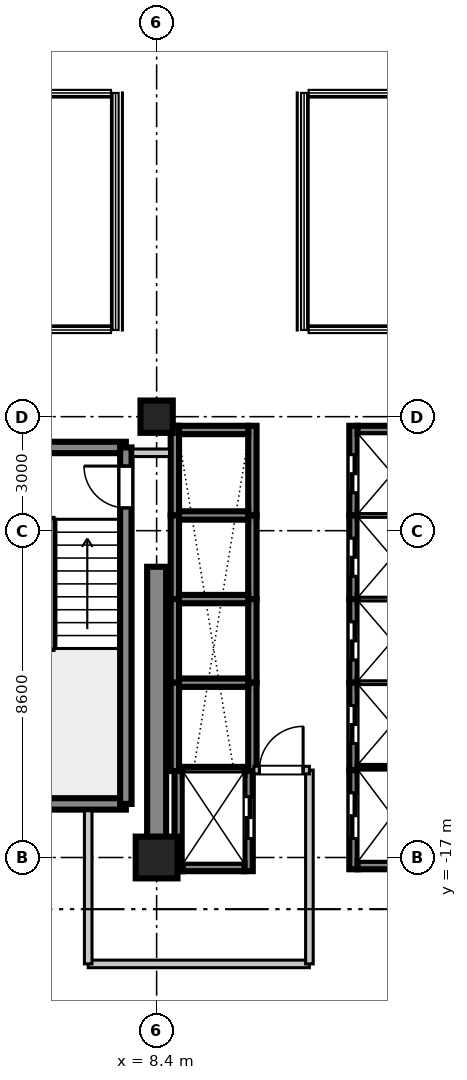
"""IFC4 building model, lengths in metres.
Left out: names, types, materials, properties, quantities, classifications, styles, units other than length and angle.
Written with IfcOpenShell. Run it as: python <this file> out.ifc"""

import sys

from ifc_helpers import new_model, si_unit, direction, frame, frame_2d, origin, origin_2d, place, context, subcontext, project, spatial, rectangle, extrude, source, transform, mapped, element, fill, save


model = new_model("IFC4")
c1 = context("Model", 3, precision=1e-05, world=origin(), true_north=direction((0.0, 1.0)))
c2 = subcontext(c1, "Body", "Model", "MODEL_VIEW")
j1 = project(units=[si_unit("LENGTHUNIT", "METRE"), si_unit("PLANEANGLEUNIT", "RADIAN")], contexts=[c1])
p1 = place(None, origin())
s1 = spatial("IfcSite", under=j1, at=p1, CompositionType="ELEMENT")
p2 = place(p1, origin())
s2 = spatial("IfcBuilding", under=s1, at=p2, CompositionType="ELEMENT")
p3 = place(p2, frame((0.0, 0.0, 185.5)))
s3 = spatial("IfcBuildingStorey", under=s2, at=p3, CompositionType="ELEMENT", Elevation=185.5)
m1 = source(origin(), c2, "Body", "SweptSolid", [
    extrude(rectangle(XDim=1.1, YDim=1.1, at=origin_2d()), origin(), (0.0, 0.0, 1.0), 3.605),
])
p4 = place(p3, frame((8.4, -17.0, 0.0), z_axis=(0.0, 0.0, 1.0), x_axis=(1.0, 0.0, 0.0)))
e1 = element("IfcColumn", 1, at=p4, inside=s3, PredefinedType="COLUMN", context=c2, shape_type="MappedRepresentation", body=[
    mapped(m1, transform((0.0, 0.0, 0.0), scale=1.0)),
])
m2 = source(origin(), c2, "Body", "SweptSolid", [
    extrude(rectangle(XDim=0.85, YDim=0.85, at=origin_2d()), origin(), (0.0, 0.0, 1.0), 3.605),
])
p5 = place(p3, frame((8.4, -5.4, 0.0), z_axis=(0.0, 0.0, 1.0), x_axis=(1.0, 0.0, 0.0)))
e2 = element("IfcColumn", 2, at=p5, inside=s3, PredefinedType="PILASTER", context=c2, shape_type="MappedRepresentation", body=[
    mapped(m2, transform((0.0, 0.0, 0.0), scale=1.0)),
])
m3 = source(origin(), c2, "Body", "SweptSolid", [
    extrude(rectangle(XDim=7.65, YDim=0.5, at=frame_2d((3.825, 0.0))), origin(), (0.0, 0.0, 1.0), 3.39),
])
p6 = place(p3, frame((8.4, -17.0, 0.0), z_axis=(0.0, 0.0, 1.0), x_axis=(0.0, 1.0, 0.0)))
e3 = element("IfcWall", 3, at=p6, inside=s3, PredefinedType="SHEAR", context=c2, shape_type="MappedRepresentation", body=[
    mapped(m3, transform((0.0, 0.0, 0.0), scale=1.0)),
])
m4 = source(origin(), c2, "Body", "SweptSolid", [
    extrude(rectangle(XDim=3.98, YDim=0.3, at=frame_2d((1.99, 0.0))), origin(), (0.0, 0.0, 1.0), 3.39),
])
for number, where, z_axis, x_axis in (
    (4, (3.61, -15.59, 0.0), (0.0, 0.0, 1.0), (1.0, 0.0, 0.0)),
    (5, (3.61, -6.21, 0.0), (0.0, 0.0, 1.0), (1.0, 0.0, 0.0)),
):
    element("IfcWall", number, at=place(p3, frame(where, z_axis=z_axis, x_axis=x_axis)), inside=s3, PredefinedType="SHEAR", context=c2, shape_type="MappedRepresentation", body=[
        mapped(m4, transform((0.0, 0.0, 0.0), scale=1.0)),
    ])
m5 = source(origin(), c2, "Body", "SweptSolid", [
    extrude(rectangle(XDim=9.38, YDim=0.3, at=frame_2d((4.69, 0.0))), origin(), (0.0, 0.0, 1.0), 3.39),
])
p7 = place(p3, frame((7.59, -15.59, 0.0), z_axis=(0.0, 0.0, 1.0), x_axis=(0.0, 1.0, 0.0)))
e6 = element("IfcWall", 6, at=p7, inside=s3, PredefinedType="SHEAR", context=c2, shape_type="MappedRepresentation", body=[
    mapped(m5, transform((0.0, 0.0, 0.0), scale=1.0)),
])
p8 = place(p7, frame((7.79, 0.0, 0.0)))
e7 = element("IfcOpeningElement", 7, at=p8, cuts=e6, PredefinedType="OPENING", context=c2, shape_type="SweptSolid", body=[
    extrude(rectangle(XDim=1.1, YDim=2.15, at=frame_2d((0.55, 1.075))), frame((0.0, 0.16, 0.0), z_axis=(0.0, -1.0, 0.0), x_axis=(1.0, 0.0, 0.0)), (0.0, 0.0, 1.0), 0.32),
])
m6 = source(origin(), c2, "Body", "SweptSolid", [
    extrude(rectangle(XDim=2.36, YDim=0.22, at=frame_2d((1.18, 0.0))), origin(), (0.0, 0.0, 1.0), 3.39),
])
p9 = place(p3, frame((13.58, -8.0, 0.0), z_axis=(0.0, 0.0, 1.0), x_axis=(0.0, 1.0, 0.0)))
e8 = element("IfcWall", 8, at=p9, inside=s3, PredefinedType="SHEAR", context=c2, shape_type="MappedRepresentation", body=[
    mapped(m6, transform((0.0, 0.0, 0.0), scale=1.0)),
])
p10 = place(p9, frame((0.6, 0.0, 0.0)))
e9 = element("IfcOpeningElement", 9, at=p10, cuts=e8, PredefinedType="OPENING", context=c2, shape_type="SweptSolid", body=[
    extrude(rectangle(XDim=1.0, YDim=2.2, at=frame_2d((0.5, 1.1))), frame((0.0, 0.12, 0.0), z_axis=(0.0, -1.0, 0.0), x_axis=(1.0, 0.0, 0.0)), (0.0, 0.0, 1.0), 0.24),
])
m7 = source(origin(), c2, "Body", "SweptSolid", [
    extrude(rectangle(XDim=1.82, YDim=0.22, at=frame_2d((0.91, 0.0))), origin(), (0.0, 0.0, 1.0), 3.39),
])
p11 = place(p3, frame((13.69, -5.75, 0.0), z_axis=(0.0, 0.0, 1.0), x_axis=(1.0, 0.0, 0.0)))
e10 = element("IfcWall", 10, at=p11, inside=s3, PredefinedType="SHEAR", context=c2, shape_type="MappedRepresentation", body=[
    mapped(m7, transform((0.0, 0.0, 0.0), scale=1.0)),
])
m8 = source(origin(), c2, "Body", "SweptSolid", [
    extrude(rectangle(XDim=2.2, YDim=0.22, at=frame_2d((1.1, 0.0))), origin(), (0.0, 0.0, 1.0), 3.39),
])
p12 = place(p3, frame((13.58, -10.2, 0.0), z_axis=(0.0, 0.0, 1.0), x_axis=(0.0, 1.0, 0.0)))
e11 = element("IfcWall", 11, at=p12, inside=s3, PredefinedType="SHEAR", context=c2, shape_type="MappedRepresentation", body=[
    mapped(m8, transform((0.0, 0.0, 0.0), scale=1.0)),
])
p13 = place(p12, frame((0.6, 0.0, 0.0)))
e12 = element("IfcOpeningElement", 12, at=p13, cuts=e11, PredefinedType="OPENING", context=c2, shape_type="SweptSolid", body=[
    extrude(rectangle(XDim=1.0, YDim=2.2, at=frame_2d((0.5, 1.1))), frame((0.0, 0.12, 0.0), z_axis=(0.0, -1.0, 0.0), x_axis=(1.0, 0.0, 0.0)), (0.0, 0.0, 1.0), 0.24),
])
m9 = source(origin(), c2, "Body", "SweptSolid", [
    extrude(rectangle(XDim=1.82, YDim=0.22, at=frame_2d((0.91, 0.0))), origin(), (0.0, 0.0, 1.0), 3.65),
])
p14 = place(p3, frame((13.69, -8.0, 0.0), z_axis=(0.0, 0.0, 1.0), x_axis=(1.0, 0.0, 0.0)))
e13 = element("IfcWall", 13, at=p14, inside=s3, PredefinedType="SHEAR", context=c2, shape_type="MappedRepresentation", body=[
    mapped(m9, transform((0.0, 0.0, 0.0), scale=1.0)),
])
p15 = place(p3, frame((13.58, -12.4, 0.0), z_axis=(0.0, 0.0, 1.0), x_axis=(0.0, 1.0, 0.0)))
e14 = element("IfcWall", 14, at=p15, inside=s3, PredefinedType="SHEAR", context=c2, shape_type="MappedRepresentation", body=[
    mapped(m8, transform((0.0, 0.0, 0.0), scale=1.0)),
])
p16 = place(p15, frame((0.6, 0.0, 0.0)))
e15 = element("IfcOpeningElement", 15, at=p16, cuts=e14, PredefinedType="OPENING", context=c2, shape_type="SweptSolid", body=[
    extrude(rectangle(XDim=1.0, YDim=2.2, at=frame_2d((0.5, 1.1))), frame((0.0, 0.12, 0.0), z_axis=(0.0, -1.0, 0.0), x_axis=(1.0, 0.0, 0.0)), (0.0, 0.0, 1.0), 0.24),
])
p17 = place(p3, frame((13.69, -10.2, 0.0), z_axis=(0.0, 0.0, 1.0), x_axis=(1.0, 0.0, 0.0)))
e16 = element("IfcWall", 16, at=p17, inside=s3, PredefinedType="SHEAR", context=c2, shape_type="MappedRepresentation", body=[
    mapped(m9, transform((0.0, 0.0, 0.0), scale=1.0)),
])
m10 = source(origin(), c2, "Body", "SweptSolid", [
    extrude(rectangle(XDim=2.3, YDim=0.22, at=frame_2d((1.15, 0.0))), origin(), (0.0, 0.0, 1.0), 3.39),
])
p18 = place(p3, frame((13.58, -14.7, 0.0), z_axis=(0.0, 0.0, 1.0), x_axis=(0.0, 1.0, 0.0)))
e17 = element("IfcWall", 17, at=p18, inside=s3, PredefinedType="SHEAR", context=c2, shape_type="MappedRepresentation", body=[
    mapped(m10, transform((0.0, 0.0, 0.0), scale=1.0)),
])
p19 = place(p18, frame((0.7, 0.0, 0.0)))
e18 = element("IfcOpeningElement", 18, at=p19, cuts=e17, PredefinedType="OPENING", context=c2, shape_type="SweptSolid", body=[
    extrude(rectangle(XDim=1.0, YDim=2.2, at=frame_2d((0.5, 1.1))), frame((0.0, 0.12, 0.0), z_axis=(0.0, -1.0, 0.0), x_axis=(1.0, 0.0, 0.0)), (0.0, 0.0, 1.0), 0.24),
])
p20 = place(p3, frame((13.69, -12.4, 0.0), z_axis=(0.0, 0.0, 1.0), x_axis=(1.0, 0.0, 0.0)))
e19 = element("IfcWall", 19, at=p20, inside=s3, PredefinedType="SHEAR", context=c2, shape_type="MappedRepresentation", body=[
    mapped(m9, transform((0.0, 0.0, 0.0), scale=1.0)),
])
for number, where, z_axis, x_axis in (
    (20, (8.88, -8.0, 0.0), (0.0, 0.0, 1.0), (0.0, 1.0, 0.0)),
    (21, (10.92, -8.0, 0.0), (0.0, 0.0, 1.0), (0.0, 1.0, 0.0)),
):
    element("IfcWall", number, at=place(p3, frame(where, z_axis=z_axis, x_axis=x_axis)), inside=s3, PredefinedType="SHEAR", context=c2, shape_type="MappedRepresentation", body=[
        mapped(m6, transform((0.0, 0.0, 0.0), scale=1.0)),
    ])
p21 = place(p3, frame((8.99, -5.75, 0.0), z_axis=(0.0, 0.0, 1.0), x_axis=(1.0, 0.0, 0.0)))
e22 = element("IfcWall", 22, at=p21, inside=s3, PredefinedType="SHEAR", context=c2, shape_type="MappedRepresentation", body=[
    mapped(m7, transform((0.0, 0.0, 0.0), scale=1.0)),
])
for number, where, z_axis, x_axis in (
    (23, (8.88, -10.2, 0.0), (0.0, 0.0, 1.0), (0.0, 1.0, 0.0)),
    (24, (10.92, -10.2, 0.0), (0.0, 0.0, 1.0), (0.0, 1.0, 0.0)),
):
    element("IfcWall", number, at=place(p3, frame(where, z_axis=z_axis, x_axis=x_axis)), inside=s3, PredefinedType="SHEAR", context=c2, shape_type="MappedRepresentation", body=[
        mapped(m8, transform((0.0, 0.0, 0.0), scale=1.0)),
    ])
p22 = place(p3, frame((8.99, -8.0, 0.0), z_axis=(0.0, 0.0, 1.0), x_axis=(1.0, 0.0, 0.0)))
e25 = element("IfcWall", 25, at=p22, inside=s3, PredefinedType="SHEAR", context=c2, shape_type="MappedRepresentation", body=[
    mapped(m9, transform((0.0, 0.0, 0.0), scale=1.0)),
])
for number, where, z_axis, x_axis in (
    (26, (8.88, -12.4, 0.0), (0.0, 0.0, 1.0), (0.0, 1.0, 0.0)),
    (27, (10.92, -12.4, 0.0), (0.0, 0.0, 1.0), (0.0, 1.0, 0.0)),
):
    element("IfcWall", number, at=place(p3, frame(where, z_axis=z_axis, x_axis=x_axis)), inside=s3, PredefinedType="SHEAR", context=c2, shape_type="MappedRepresentation", body=[
        mapped(m8, transform((0.0, 0.0, 0.0), scale=1.0)),
    ])
p23 = place(p3, frame((8.99, -10.2, 0.0), z_axis=(0.0, 0.0, 1.0), x_axis=(1.0, 0.0, 0.0)))
e28 = element("IfcWall", 28, at=p23, inside=s3, PredefinedType="SHEAR", context=c2, shape_type="MappedRepresentation", body=[
    mapped(m9, transform((0.0, 0.0, 0.0), scale=1.0)),
])
m11 = source(origin(), c2, "Body", "SweptSolid", [
    extrude(rectangle(XDim=2.325, YDim=0.22, at=frame_2d((1.163, 0.0))), origin(), (0.0, 0.0, 1.0), 3.39),
])
for number, where, z_axis, x_axis in (
    (29, (8.88, -14.725, 0.0), (0.0, 0.0, 1.0), (0.0, 1.0, 0.0)),
    (30, (10.92, -14.725, 0.0), (0.0, 0.0, 1.0), (0.0, 1.0, 0.0)),
):
    element("IfcWall", number, at=place(p3, frame(where, z_axis=z_axis, x_axis=x_axis)), inside=s3, PredefinedType="SHEAR", context=c2, shape_type="MappedRepresentation", body=[
        mapped(m11, transform((0.0, 0.0, 0.0), scale=1.0)),
    ])
p24 = place(p3, frame((8.99, -12.4, 0.0), z_axis=(0.0, 0.0, 1.0), x_axis=(1.0, 0.0, 0.0)))
e31 = element("IfcWall", 31, at=p24, inside=s3, PredefinedType="SHEAR", context=c2, shape_type="MappedRepresentation", body=[
    mapped(m9, transform((0.0, 0.0, 0.0), scale=1.0)),
])
m12 = source(origin(), c2, "Body", "SweptSolid", [
    extrude(rectangle(XDim=2.635, YDim=0.22, at=frame_2d((1.317, 0.0))), origin(), (0.0, 0.0, 1.0), 3.39),
])
p25 = place(p3, frame((8.98, -17.36, 0.0), z_axis=(0.0, 0.0, 1.0), x_axis=(0.0, 1.0, 0.0)))
e32 = element("IfcWall", 32, at=p25, inside=s3, PredefinedType="SHEAR", context=c2, shape_type="MappedRepresentation", body=[
    mapped(m12, transform((0.0, 0.0, 0.0), scale=1.0)),
])
p26 = place(p3, frame((10.82, -17.36, 0.0), z_axis=(0.0, 0.0, 1.0), x_axis=(0.0, 1.0, 0.0)))
e33 = element("IfcWall", 33, at=p26, inside=s3, PredefinedType="SHEAR", context=c2, shape_type="MappedRepresentation", body=[
    mapped(m12, transform((0.0, 0.0, 0.0), scale=1.0)),
])
p27 = place(p26, frame((0.86, 0.0, 0.0)))
e34 = element("IfcOpeningElement", 34, at=p27, cuts=e33, PredefinedType="OPENING", context=c2, shape_type="SweptSolid", body=[
    extrude(rectangle(XDim=1.1, YDim=2.2, at=frame_2d((0.55, 1.1))), frame((0.0, 0.12, 0.0), z_axis=(0.0, -1.0, 0.0), x_axis=(1.0, 0.0, 0.0)), (0.0, 0.0, 1.0), 0.24),
])
m13 = source(origin(), c2, "Body", "SweptSolid", [
    extrude(rectangle(XDim=1.62, YDim=0.22, at=frame_2d((0.81, 0.0))), origin(), (0.0, 0.0, 1.0), 3.39),
])
p28 = place(p3, frame((9.09, -17.25, 0.0), z_axis=(0.0, 0.0, 1.0), x_axis=(1.0, 0.0, 0.0)))
e35 = element("IfcWall", 35, at=p28, inside=s3, PredefinedType="SHEAR", context=c2, shape_type="MappedRepresentation", body=[
    mapped(m13, transform((0.0, 0.0, 0.0), scale=1.0)),
])
m14 = source(origin(), c2, "Body", "SweptSolid", [
    extrude(rectangle(XDim=1.62, YDim=0.22, at=frame_2d((0.81, 0.0))), origin(), (0.0, 0.0, 1.0), 3.65),
])
p29 = place(p3, frame((9.09, -14.725, 0.0), z_axis=(0.0, 0.0, 1.0), x_axis=(1.0, 0.0, 0.0)))
e36 = element("IfcWall", 36, at=p29, inside=s3, PredefinedType="SHEAR", context=c2, shape_type="MappedRepresentation", body=[
    mapped(m14, transform((0.0, 0.0, 0.0), scale=1.0)),
])
m15 = source(origin(), c2, "Body", "SweptSolid", [
    extrude(rectangle(XDim=2.61, YDim=0.22, at=frame_2d((1.305, 0.0))), origin(), (0.0, 0.0, 1.0), 3.39),
])
p30 = place(p3, frame((13.58, -17.31, 0.0), z_axis=(0.0, 0.0, 1.0), x_axis=(0.0, 1.0, 0.0)))
e37 = element("IfcWall", 37, at=p30, inside=s3, PredefinedType="SHEAR", context=c2, shape_type="MappedRepresentation", body=[
    mapped(m15, transform((0.0, 0.0, 0.0), scale=1.0)),
])
p31 = place(p30, frame((0.81, 0.0, 0.0)))
e38 = element("IfcOpeningElement", 38, at=p31, cuts=e37, PredefinedType="OPENING", context=c2, shape_type="SweptSolid", body=[
    extrude(rectangle(XDim=1.2, YDim=2.2, at=frame_2d((0.6, 1.1))), frame((0.0, 0.12, 0.0), z_axis=(0.0, -1.0, 0.0), x_axis=(1.0, 0.0, 0.0)), (0.0, 0.0, 1.0), 0.24),
])
p32 = place(p3, frame((13.69, -17.2, 0.0), z_axis=(0.0, 0.0, 1.0), x_axis=(1.0, 0.0, 0.0)))
e39 = element("IfcWall", 39, at=p32, inside=s3, PredefinedType="SHEAR", context=c2, shape_type="MappedRepresentation", body=[
    mapped(m7, transform((0.0, 0.0, 0.0), scale=1.0)),
])
p33 = place(p3, frame((13.69, -14.7, 0.0), z_axis=(0.0, 0.0, 1.0), x_axis=(1.0, 0.0, 0.0)))
e40 = element("IfcWall", 40, at=p33, inside=s3, PredefinedType="SHEAR", context=c2, shape_type="MappedRepresentation", body=[
    mapped(m9, transform((0.0, 0.0, 0.0), scale=1.0)),
])
m16 = source(origin(), c2, "Body", "SweptSolid", [
    extrude(rectangle(XDim=5.82, YDim=0.2, at=frame_2d((2.91, 0.0))), origin(), (0.0, 0.0, 1.0), 2.73),
])
p34 = place(p3, frame((6.6, -19.8, 0.0), z_axis=(0.0, 0.0, 1.0), x_axis=(1.0, 0.0, 0.0)))
e41 = element("IfcWall", 41, at=p34, inside=s3, PredefinedType="PARTITIONING", context=c2, shape_type="MappedRepresentation", body=[
    mapped(m16, transform((0.0, 0.0, 0.0), scale=1.0)),
])
m17 = source(origin(), c2, "Body", "SweptSolid", [
    extrude(rectangle(XDim=4.03, YDim=0.2, at=frame_2d((2.015, 0.0))), origin(), (0.0, 0.0, 1.0), 2.73),
])
p35 = place(p3, frame((6.6, -19.8, 0.0), z_axis=(0.0, 0.0, 1.0), x_axis=(0.0, 1.0, 0.0)))
e42 = element("IfcWall", 42, at=p35, inside=s3, PredefinedType="PARTITIONING", context=c2, shape_type="MappedRepresentation", body=[
    mapped(m17, transform((0.0, 0.0, 0.0), scale=1.0)),
])
m18 = source(origin(), c2, "Body", "SweptSolid", [
    extrude(rectangle(XDim=5.1, YDim=0.2, at=frame_2d((2.55, 0.0))), origin(), (0.0, 0.0, 1.0), 2.73),
])
p36 = place(p3, frame((12.42, -19.8, 0.0), z_axis=(0.0, 0.0, 1.0), x_axis=(0.0, 1.0, 0.0)))
e43 = element("IfcWall", 43, at=p36, inside=s3, PredefinedType="PARTITIONING", context=c2, shape_type="MappedRepresentation", body=[
    mapped(m18, transform((0.0, 0.0, 0.0), scale=1.0)),
])
m19 = source(origin(), c2, "Body", "SweptSolid", [
    extrude(rectangle(XDim=1.46, YDim=0.2, at=frame_2d((0.73, 0.0))), origin(), (0.0, 0.0, 1.0), 2.73),
])
p37 = place(p3, frame((10.96, -14.7, 0.0), z_axis=(0.0, 0.0, 1.0), x_axis=(1.0, 0.0, 0.0)))
e44 = element("IfcWall", 44, at=p37, inside=s3, PredefinedType="PARTITIONING", context=c2, shape_type="MappedRepresentation", body=[
    mapped(m19, transform((0.0, 0.0, 0.0), scale=1.0)),
])
p38 = place(p37, frame((0.145, 0.0, 0.0)))
e45 = element("IfcOpeningElement", 45, at=p38, cuts=e44, PredefinedType="OPENING", context=c2, shape_type="SweptSolid", body=[
    extrude(rectangle(XDim=1.15, YDim=2.15, at=frame_2d((0.575, 1.075))), frame((0.0, 0.11, 0.0), z_axis=(0.0, -1.0, 0.0), x_axis=(1.0, 0.0, 0.0)), (0.0, 0.0, 1.0), 0.22),
])
m20 = source(origin(), c2, "Body", "SweptSolid", [
    extrude(rectangle(XDim=0.97, YDim=0.2, at=frame_2d((0.485, 0.0))), origin(), (0.0, 0.0, 1.0), 2.73),
])
p39 = place(p3, frame((7.77, -6.35, 0.0), z_axis=(0.0, 0.0, 1.0), x_axis=(1.0, 0.0, 0.0)))
e46 = element("IfcWall", 46, at=p39, inside=s3, PredefinedType="PARTITIONING", context=c2, shape_type="MappedRepresentation", body=[
    mapped(m20, transform((0.0, 0.0, 0.0), scale=1.0)),
])
m21 = source(origin(), c2, "Body", "SweptSolid", [
    extrude(rectangle(XDim=1.1, YDim=2.15, at=frame_2d((0.55, 1.075))), frame((0.0, 0.025, 0.0), z_axis=(0.0, -1.0, 0.0), x_axis=(1.0, 0.0, 0.0)), (0.0, 0.0, 1.0), 0.05),
])
p40 = place(p8, origin())
e47 = element("IfcDoor", 47, at=p40, inside=s3, OperationType="SINGLE_SWING_RIGHT", PredefinedType="DOOR", context=c2, shape_type="MappedRepresentation", body=[
    mapped(m21, transform((0.0, 0.0, 0.0), scale=1.0)),
])
fill(e7, e47)
m22 = source(origin(), c2, "Body", "SweptSolid", [
    extrude(rectangle(XDim=1.0, YDim=2.2, at=frame_2d((0.5, 1.1))), frame((0.0, 0.025, 0.0), z_axis=(0.0, -1.0, 0.0), x_axis=(1.0, 0.0, 0.0)), (0.0, 0.0, 1.0), 0.05),
])
p41 = place(p10, origin())
e48 = element("IfcDoor", 48, at=p41, inside=s3, OperationType="DOUBLE_DOOR_SLIDING", PredefinedType="DOOR", context=c2, shape_type="MappedRepresentation", body=[
    mapped(m22, transform((0.0, 0.0, 0.0), scale=1.0)),
])
fill(e9, e48)
p42 = place(p13, origin())
e49 = element("IfcDoor", 49, at=p42, inside=s3, OperationType="DOUBLE_DOOR_SLIDING", PredefinedType="DOOR", context=c2, shape_type="MappedRepresentation", body=[
    mapped(m22, transform((0.0, 0.0, 0.0), scale=1.0)),
])
fill(e12, e49)
p43 = place(p16, origin())
e50 = element("IfcDoor", 50, at=p43, inside=s3, OperationType="DOUBLE_DOOR_SLIDING", PredefinedType="DOOR", context=c2, shape_type="MappedRepresentation", body=[
    mapped(m22, transform((0.0, 0.0, 0.0), scale=1.0)),
])
fill(e15, e50)
p44 = place(p19, origin())
e51 = element("IfcDoor", 51, at=p44, inside=s3, OperationType="DOUBLE_DOOR_SLIDING", PredefinedType="DOOR", context=c2, shape_type="MappedRepresentation", body=[
    mapped(m22, transform((0.0, 0.0, 0.0), scale=1.0)),
])
fill(e18, e51)
m23 = source(origin(), c2, "Body", "SweptSolid", [
    extrude(rectangle(XDim=1.1, YDim=2.2, at=frame_2d((0.55, 1.1))), frame((0.0, 0.025, 0.0), z_axis=(0.0, -1.0, 0.0), x_axis=(1.0, 0.0, 0.0)), (0.0, 0.0, 1.0), 0.05),
])
p45 = place(p27, frame((1.1, 0.0, 0.0), z_axis=(0.0, 0.0, 1.0), x_axis=(-1.0, 0.0, 0.0)))
e52 = element("IfcDoor", 52, at=p45, inside=s3, OperationType="DOUBLE_DOOR_SLIDING", PredefinedType="DOOR", context=c2, shape_type="MappedRepresentation", body=[
    mapped(m23, transform((0.0, 0.0, 0.0), scale=1.0)),
])
fill(e34, e52)
m24 = source(origin(), c2, "Body", "SweptSolid", [
    extrude(rectangle(XDim=1.2, YDim=2.2, at=frame_2d((0.6, 1.1))), frame((0.0, 0.025, 0.0), z_axis=(0.0, -1.0, 0.0), x_axis=(1.0, 0.0, 0.0)), (0.0, 0.0, 1.0), 0.05),
])
p46 = place(p31, origin())
e53 = element("IfcDoor", 53, at=p46, inside=s3, OperationType="DOUBLE_DOOR_SLIDING", PredefinedType="DOOR", context=c2, shape_type="MappedRepresentation", body=[
    mapped(m24, transform((0.0, 0.0, 0.0), scale=1.0)),
])
fill(e38, e53)
m25 = source(origin(), c2, "Body", "SweptSolid", [
    extrude(rectangle(XDim=1.15, YDim=2.15, at=frame_2d((0.575, 1.075))), frame((0.0, 0.025, 0.0), z_axis=(0.0, -1.0, 0.0), x_axis=(1.0, 0.0, 0.0)), (0.0, 0.0, 1.0), 0.05),
])
p47 = place(p38, origin())
e54 = element("IfcDoor", 54, at=p47, inside=s3, OperationType="SINGLE_SWING_RIGHT", PredefinedType="DOOR", context=c2, shape_type="MappedRepresentation", body=[
    mapped(m25, transform((0.0, 0.0, 0.0), scale=1.0)),
])
fill(e45, e54)
save(model, sys.argv[1])
